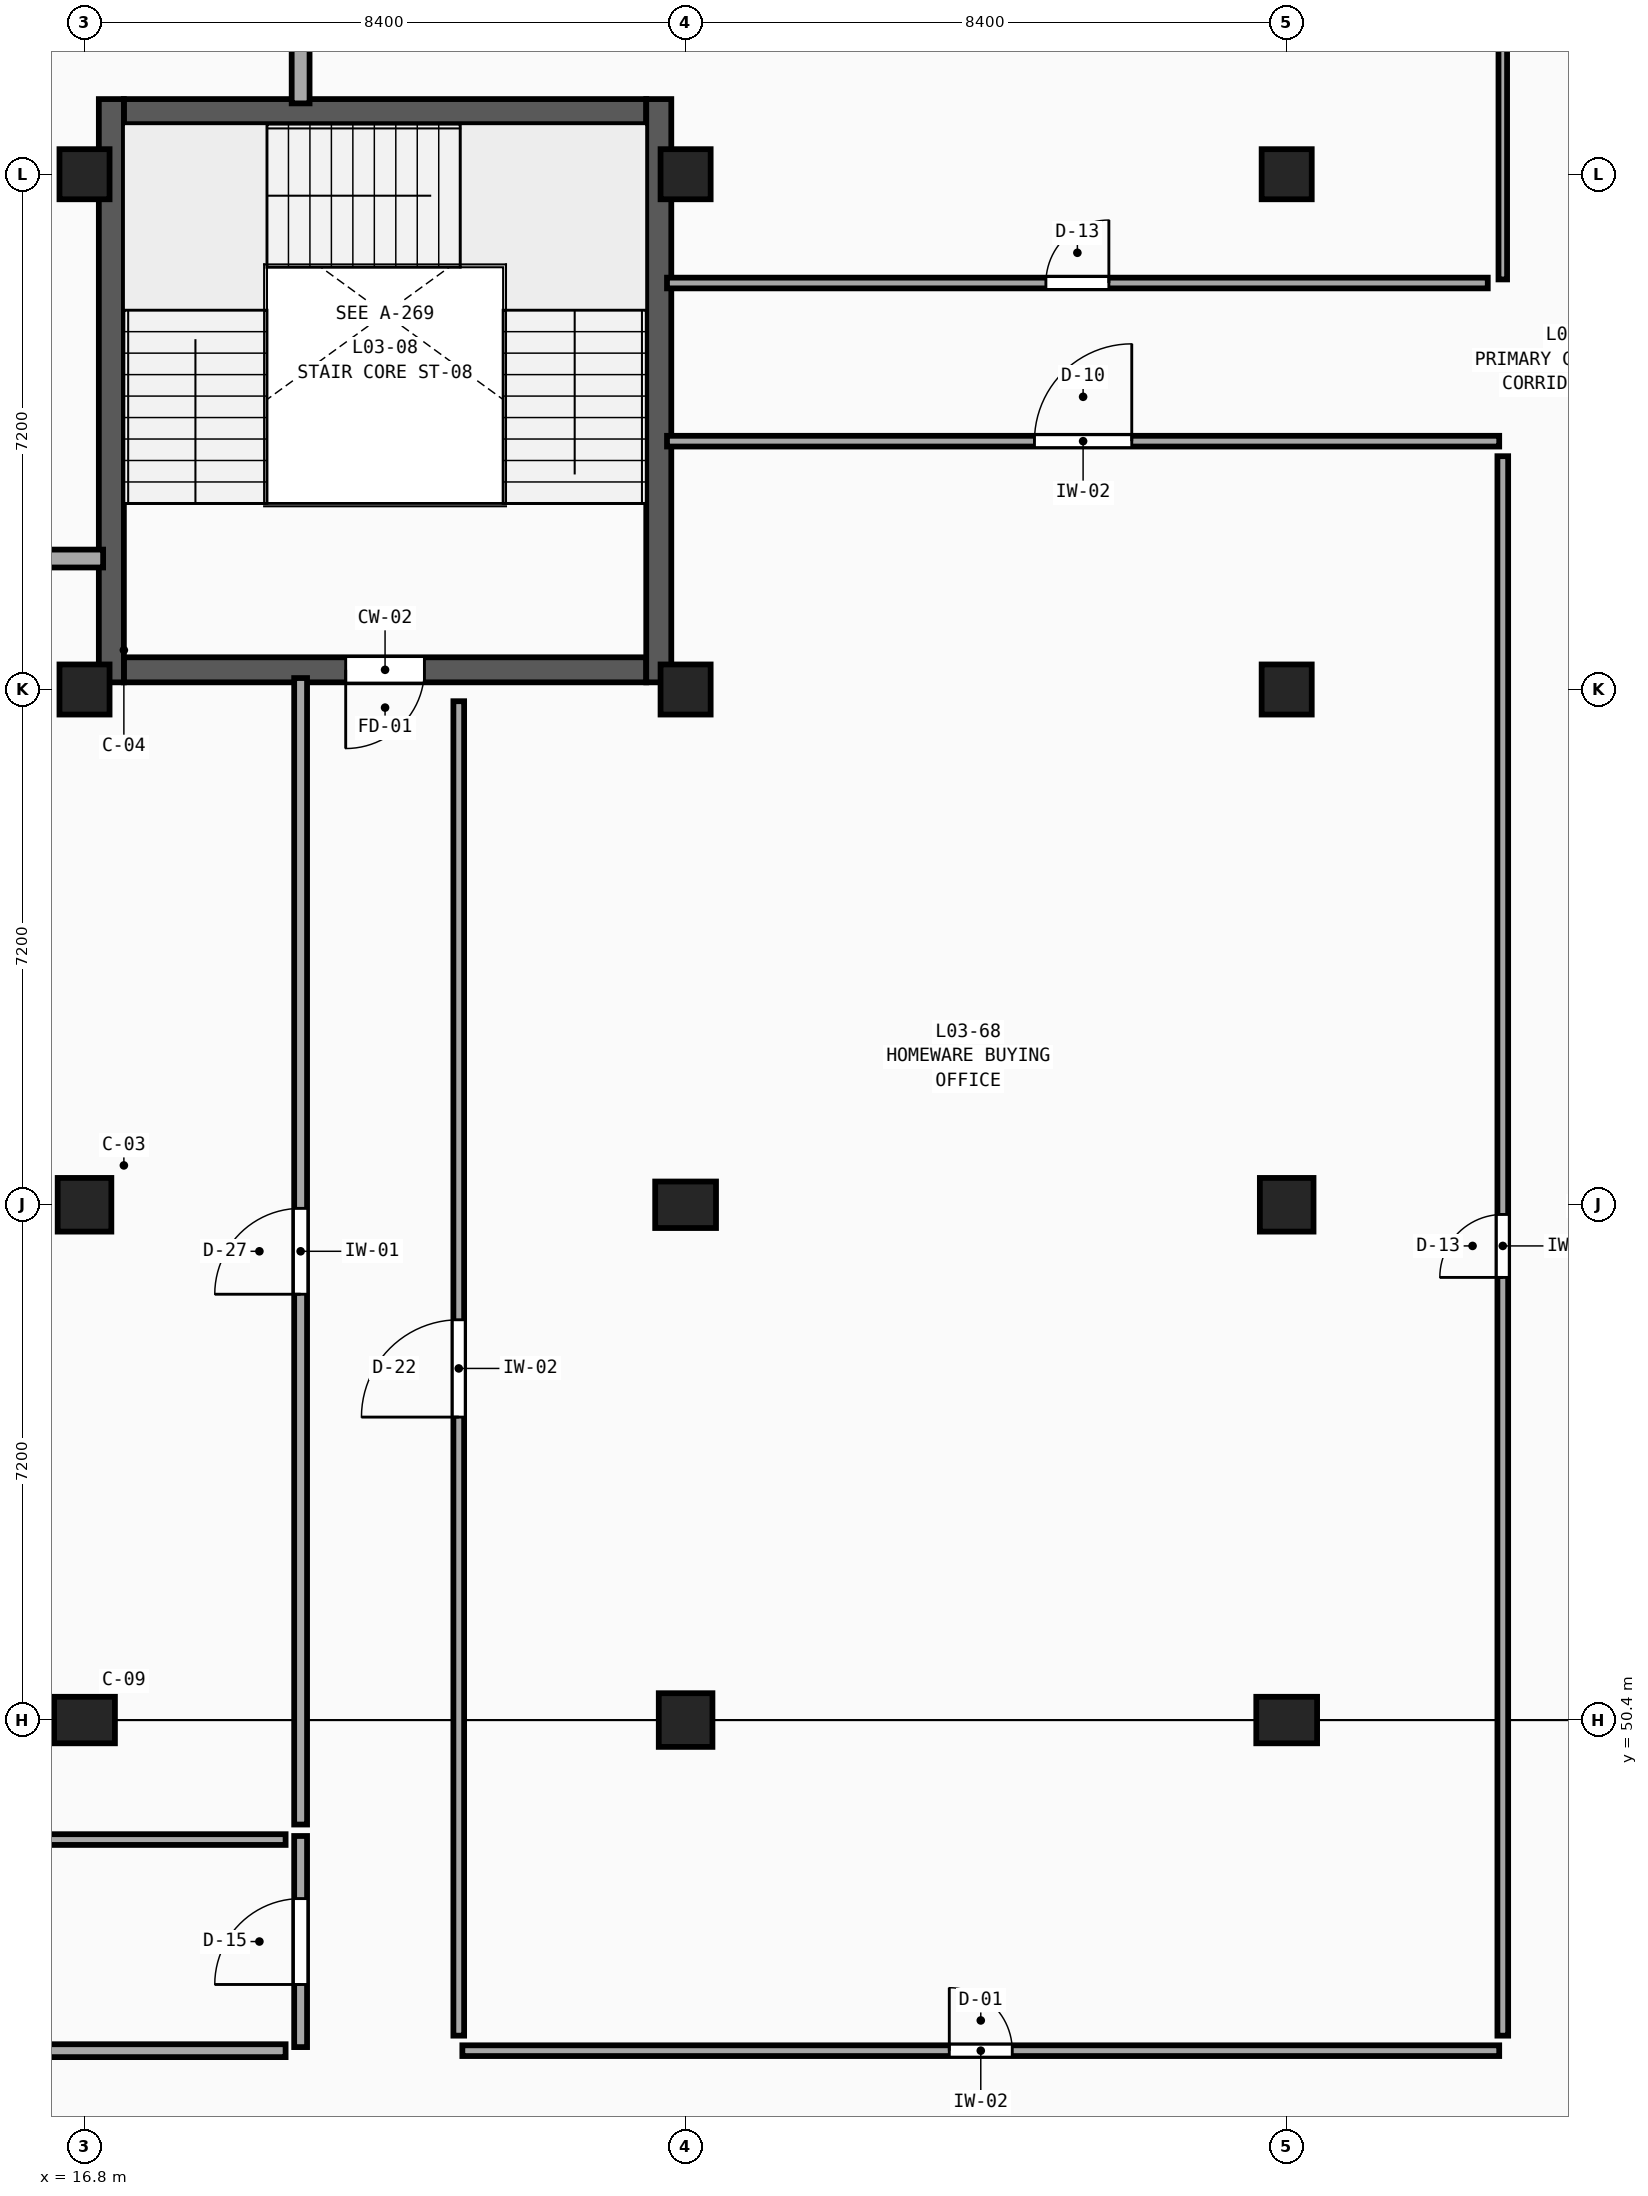
"""IFC4 building model, lengths in metres.
Left out: names, types, materials, properties, quantities, classifications, styles, units other than length and angle.
Written with IfcOpenShell. Run it as: python <this file> out.ifc"""

import sys

from ifc_helpers import new_model, si_unit, direction, frame, frame_2d, origin, origin_2d, place, context, subcontext, project, spatial, rectangle, extrude, element, fill, save


model = new_model("IFC4")
c1 = context("Model", 3, precision=1e-05, world=origin(), true_north=direction((0.0, 1.0)))
c2 = subcontext(c1, "Body", "Model", "MODEL_VIEW")
j1 = project(units=[si_unit("LENGTHUNIT", "METRE"), si_unit("PLANEANGLEUNIT", "RADIAN")], contexts=[c1])
p1 = place(None, origin())
s1 = spatial("IfcSite", under=j1, at=p1, CompositionType="ELEMENT")
p2 = place(p1, origin())
s2 = spatial("IfcBuilding", under=s1, at=p2, CompositionType="ELEMENT")
p3 = place(p2, frame((0.0, 0.0, 14.4)))
s3 = spatial("IfcBuildingStorey", under=s2, at=p3, CompositionType="ELEMENT", Elevation=14.4)
p4 = place(p3, frame((16.8, 50.4, 0.0), z_axis=(0.0, 0.0, 1.0), x_axis=(1.0, 0.0, 0.0)))
e1 = element("IfcColumn", 1, at=p4, inside=s3, PredefinedType="COLUMN", context=c2, shape_type="SweptSolid", body=[
    extrude(rectangle(XDim=0.85, YDim=0.65, at=origin_2d()), origin(), (0.0, 0.0, 1.0), 4.5),
])
p5 = place(p3, frame((16.8, 57.6, 0.0), z_axis=(0.0, 0.0, 1.0), x_axis=(1.0, 0.0, 0.0)))
e2 = element("IfcColumn", 2, at=p5, inside=s3, PredefinedType="COLUMN", context=c2, shape_type="SweptSolid", body=[
    extrude(rectangle(XDim=0.75, YDim=0.75, at=origin_2d()), origin(), (0.0, 0.0, 1.0), 4.5),
])
for number, where, z_axis, x_axis in (
    (3, (16.8, 64.8, 0.0), (0.0, 0.0, 1.0), (1.0, 0.0, 0.0)),
    (4, (16.8, 72.0, 0.0), (0.0, 0.0, 1.0), (1.0, 0.0, 0.0)),
):
    element("IfcColumn", number, at=place(p3, frame(where, z_axis=z_axis, x_axis=x_axis)), inside=s3, PredefinedType="COLUMN", context=c2, shape_type="SweptSolid", body=[
        extrude(rectangle(XDim=0.7, YDim=0.7, at=origin_2d()), origin(), (0.0, 0.0, 1.0), 4.5),
    ])
p6 = place(p3, frame((25.2, 50.4, 0.0), z_axis=(0.0, 0.0, 1.0), x_axis=(1.0, 0.0, 0.0)))
e5 = element("IfcColumn", 5, at=p6, inside=s3, PredefinedType="COLUMN", context=c2, shape_type="SweptSolid", body=[
    extrude(rectangle(XDim=0.75, YDim=0.75, at=origin_2d()), origin(), (0.0, 0.0, 1.0), 4.5),
])
p7 = place(p3, frame((25.2, 57.6, 0.0), z_axis=(0.0, 0.0, 1.0), x_axis=(1.0, 0.0, 0.0)))
e6 = element("IfcColumn", 6, at=p7, inside=s3, PredefinedType="COLUMN", context=c2, shape_type="SweptSolid", body=[
    extrude(rectangle(XDim=0.85, YDim=0.65, at=origin_2d()), origin(), (0.0, 0.0, 1.0), 4.5),
])
for number, where, z_axis, x_axis in (
    (7, (25.2, 64.8, 0.0), (0.0, 0.0, 1.0), (1.0, 0.0, 0.0)),
    (8, (25.2, 72.0, 0.0), (0.0, 0.0, 1.0), (1.0, 0.0, 0.0)),
):
    element("IfcColumn", number, at=place(p3, frame(where, z_axis=z_axis, x_axis=x_axis)), inside=s3, PredefinedType="COLUMN", context=c2, shape_type="SweptSolid", body=[
        extrude(rectangle(XDim=0.7, YDim=0.7, at=origin_2d()), origin(), (0.0, 0.0, 1.0), 4.5),
    ])
p8 = place(p3, frame((33.6, 50.4, 0.0), z_axis=(0.0, 0.0, 1.0), x_axis=(1.0, 0.0, 0.0)))
e9 = element("IfcColumn", 9, at=p8, inside=s3, PredefinedType="COLUMN", context=c2, shape_type="SweptSolid", body=[
    extrude(rectangle(XDim=0.85, YDim=0.65, at=origin_2d()), origin(), (0.0, 0.0, 1.0), 4.5),
])
p9 = place(p3, frame((33.6, 57.6, 0.0), z_axis=(0.0, 0.0, 1.0), x_axis=(1.0, 0.0, 0.0)))
e10 = element("IfcColumn", 10, at=p9, inside=s3, PredefinedType="COLUMN", context=c2, shape_type="SweptSolid", body=[
    extrude(rectangle(XDim=0.75, YDim=0.75, at=origin_2d()), origin(), (0.0, 0.0, 1.0), 4.5),
])
for number, where, z_axis, x_axis in (
    (11, (33.6, 64.8, 0.0), (0.0, 0.0, 1.0), (1.0, 0.0, 0.0)),
    (12, (33.6, 72.0, 0.0), (0.0, 0.0, 1.0), (1.0, 0.0, 0.0)),
):
    element("IfcColumn", number, at=place(p3, frame(where, z_axis=z_axis, x_axis=x_axis)), inside=s3, PredefinedType="COLUMN", context=c2, shape_type="SweptSolid", body=[
        extrude(rectangle(XDim=0.7, YDim=0.7, at=origin_2d()), origin(), (0.0, 0.0, 1.0), 4.5),
    ])
p10 = place(p3, frame((24.65, 65.075, 0.0), z_axis=(0.0, 0.0, 1.0), x_axis=(-1.0, 0.0, 0.0)))
e13 = element("IfcWall", 13, at=p10, inside=s3, PredefinedType="SHEAR", context=c2, shape_type="SweptSolid", body=[
    extrude(rectangle(XDim=7.3, YDim=0.35, at=frame_2d((3.65, 0.0))), origin(), (0.0, 0.0, 1.0), 4.5),
])
p11 = place(p10, frame((3.1, 0.0, 0.0)))
e14 = element("IfcOpeningElement", 14, at=p11, cuts=e13, PredefinedType="OPENING", context=c2, shape_type="SweptSolid", body=[
    extrude(rectangle(XDim=1.1, YDim=2.2, at=frame_2d((0.55, 1.1))), frame((0.0, 0.195, 0.0), z_axis=(0.0, -1.0, 0.0), x_axis=(1.0, 0.0, 0.0)), (0.0, 0.0, 1.0), 0.39),
])
p12 = place(p3, frame((17.35, 72.875, 0.0), z_axis=(0.0, 0.0, 1.0), x_axis=(1.0, 0.0, 0.0)))
e15 = element("IfcWall", 15, at=p12, inside=s3, PredefinedType="SHEAR", context=c2, shape_type="SweptSolid", body=[
    extrude(rectangle(XDim=7.3, YDim=0.35, at=frame_2d((3.65, 0.0))), origin(), (0.0, 0.0, 1.0), 4.5),
])
for number, where, z_axis, x_axis in (
    (16, (17.175, 73.05, 0.0), (0.0, 0.0, 1.0), (0.0, -1.0, 0.0)),
    (17, (24.825, 64.9, 0.0), (0.0, 0.0, 1.0), (0.0, 1.0, 0.0)),
):
    element("IfcWall", number, at=place(p3, frame(where, z_axis=z_axis, x_axis=x_axis)), inside=s3, PredefinedType="SHEAR", context=c2, shape_type="SweptSolid", body=[
        extrude(rectangle(XDim=8.15, YDim=0.35, at=frame_2d((4.075, 0.0))), origin(), (0.0, 0.0, 1.0), 4.5),
    ])
p13 = place(p3, frame((36.62, 45.99, 0.0), z_axis=(0.0, 0.0, 1.0), x_axis=(0.0, 1.0, 0.0)))
e18 = element("IfcWall", 18, at=p13, inside=s3, PredefinedType="PARTITIONING", context=c2, shape_type="SweptSolid", body=[
    extrude(rectangle(XDim=22.07, YDim=0.15, at=frame_2d((11.035, 0.0))), origin(), (0.0, 0.0, 1.0), 4.18),
])
p14 = place(p13, frame((10.595, 0.0, 0.0)))
e19 = element("IfcOpeningElement", 19, at=p14, cuts=e18, PredefinedType="OPENING", context=c2, shape_type="SweptSolid", body=[
    extrude(rectangle(XDim=0.88, YDim=2.21, at=frame_2d((0.44, 1.105))), frame((0.0, 0.095, 0.0), z_axis=(0.0, -1.0, 0.0), x_axis=(1.0, 0.0, 0.0)), (0.0, 0.0, 1.0), 0.19),
])
p15 = place(p3, frame((22.03, 45.99, 0.0), z_axis=(0.0, 0.0, 1.0), x_axis=(0.0, 1.0, 0.0)))
e20 = element("IfcWall", 20, at=p15, inside=s3, PredefinedType="PARTITIONING", context=c2, shape_type="SweptSolid", body=[
    extrude(rectangle(XDim=18.646, YDim=0.15, at=frame_2d((9.323, 0.0))), origin(), (0.0, 0.0, 1.0), 4.18),
])
p16 = place(p15, frame((8.643, 0.0, 0.0)))
e21 = element("IfcOpeningElement", 21, at=p16, cuts=e20, PredefinedType="OPENING", context=c2, shape_type="SweptSolid", body=[
    extrude(rectangle(XDim=1.36, YDim=2.29, at=frame_2d((0.68, 1.145))), frame((0.0, 0.095, 0.0), z_axis=(0.0, -1.0, 0.0), x_axis=(1.0, 0.0, 0.0)), (0.0, 0.0, 1.0), 0.19),
])
p17 = place(p3, frame((0.73, 45.78, 0.0), z_axis=(0.0, 0.0, 1.0), x_axis=(1.0, 0.0, 0.0)))
e22 = element("IfcWall", 22, at=p17, inside=s3, PredefinedType="PARTITIONING", context=c2, shape_type="SweptSolid", body=[
    extrude(rectangle(XDim=18.88, YDim=0.18, at=frame_2d((9.44, 0.0))), origin(), (0.0, 0.0, 1.0), 4.18),
])
p18 = place(p17, frame((8.6, 0.0, 0.0)))
e23 = element("IfcOpeningElement", 23, at=p18, cuts=e22, PredefinedType="OPENING", context=c2, shape_type="SweptSolid", body=[
    extrude(rectangle(XDim=1.68, YDim=2.29, at=frame_2d((0.84, 1.145))), frame((0.0, 0.11, 0.0), z_axis=(0.0, -1.0, 0.0), x_axis=(1.0, 0.0, 0.0)), (0.0, 0.0, 1.0), 0.22),
])
p19 = place(p3, frame((19.82, 48.94, 0.0), z_axis=(0.0, 0.0, 1.0), x_axis=(0.0, 1.0, 0.0)))
e24 = element("IfcWall", 24, at=p19, inside=s3, PredefinedType="PARTITIONING", context=c2, shape_type="SweptSolid", body=[
    extrude(rectangle(XDim=16.02, YDim=0.18, at=frame_2d((8.01, 0.0))), origin(), (0.0, 0.0, 1.0), 4.18),
])
p20 = place(p19, frame((7.41, 0.0, 0.0)))
e25 = element("IfcOpeningElement", 25, at=p20, cuts=e24, PredefinedType="OPENING", context=c2, shape_type="SweptSolid", body=[
    extrude(rectangle(XDim=1.2, YDim=2.37, at=frame_2d((0.6, 1.185))), frame((0.0, 0.11, 0.0), z_axis=(0.0, -1.0, 0.0), x_axis=(1.0, 0.0, 0.0)), (0.0, 0.0, 1.0), 0.22),
])
p21 = place(p3, frame((22.08, 45.78, 0.0), z_axis=(0.0, 0.0, 1.0), x_axis=(1.0, 0.0, 0.0)))
e26 = element("IfcWall", 26, at=p21, inside=s3, PredefinedType="PARTITIONING", context=c2, shape_type="SweptSolid", body=[
    extrude(rectangle(XDim=14.49, YDim=0.15, at=frame_2d((7.245, 0.0))), origin(), (0.0, 0.0, 1.0), 4.18),
])
p22 = place(p21, frame((6.805, 0.0, 0.0)))
e27 = element("IfcOpeningElement", 27, at=p22, cuts=e26, PredefinedType="OPENING", context=c2, shape_type="SweptSolid", body=[
    extrude(rectangle(XDim=0.88, YDim=2.05, at=frame_2d((0.44, 1.025))), frame((0.0, 0.095, 0.0), z_axis=(0.0, -1.0, 0.0), x_axis=(1.0, 0.0, 0.0)), (0.0, 0.0, 1.0), 0.19),
])
p23 = place(p3, frame((36.62, 70.53, 0.0), z_axis=(0.0, 0.0, 1.0), x_axis=(0.0, 1.0, 0.0)))
e28 = element("IfcWall", 28, at=p23, inside=s3, PredefinedType="PARTITIONING", context=c2, shape_type="SweptSolid", body=[
    extrude(rectangle(XDim=13.75, YDim=0.12, at=frame_2d((6.875, 0.0))), origin(), (0.0, 0.0, 1.0), 4.18),
])
p24 = place(p23, frame((6.115, 0.0, 0.0)))
e29 = element("IfcOpeningElement", 29, at=p24, cuts=e28, PredefinedType="OPENING", context=c2, shape_type="SweptSolid", body=[
    extrude(rectangle(XDim=1.52, YDim=2.05, at=frame_2d((0.76, 1.025))), frame((0.0, 0.08, 0.0), z_axis=(0.0, -1.0, 0.0), x_axis=(1.0, 0.0, 0.0)), (0.0, 0.0, 1.0), 0.16),
])
p25 = place(p3, frame((24.94, 68.27, 0.0), z_axis=(0.0, 0.0, 1.0), x_axis=(1.0, 0.0, 0.0)))
e30 = element("IfcWall", 30, at=p25, inside=s3, PredefinedType="PARTITIONING", context=c2, shape_type="SweptSolid", body=[
    extrude(rectangle(XDim=11.63, YDim=0.15, at=frame_2d((5.815, 0.0))), origin(), (0.0, 0.0, 1.0), 4.18),
])
p26 = place(p25, frame((5.135, 0.0, 0.0)))
e31 = element("IfcOpeningElement", 31, at=p26, cuts=e30, PredefinedType="OPENING", context=c2, shape_type="SweptSolid", body=[
    extrude(rectangle(XDim=1.36, YDim=2.13, at=frame_2d((0.68, 1.065))), frame((0.0, 0.095, 0.0), z_axis=(0.0, -1.0, 0.0), x_axis=(1.0, 0.0, 0.0)), (0.0, 0.0, 1.0), 0.19),
])
p27 = place(p3, frame((24.94, 70.48, 0.0), z_axis=(0.0, 0.0, 1.0), x_axis=(1.0, 0.0, 0.0)))
e32 = element("IfcWall", 32, at=p27, inside=s3, PredefinedType="PARTITIONING", context=c2, shape_type="SweptSolid", body=[
    extrude(rectangle(XDim=11.47, YDim=0.15, at=frame_2d((5.735, 0.0))), origin(), (0.0, 0.0, 1.0), 4.18),
])
p28 = place(p27, frame((5.295, 0.0, 0.0)))
e33 = element("IfcOpeningElement", 33, at=p28, cuts=e32, PredefinedType="OPENING", context=c2, shape_type="SweptSolid", body=[
    extrude(rectangle(XDim=0.88, YDim=2.21, at=frame_2d((0.44, 1.105))), frame((0.0, 0.095, 0.0), z_axis=(0.0, -1.0, 0.0), x_axis=(1.0, 0.0, 0.0)), (0.0, 0.0, 1.0), 0.19),
])
p29 = place(p3, frame((19.82, 72.99, 0.0), z_axis=(0.0, 0.0, 1.0), x_axis=(0.0, 1.0, 0.0)))
e34 = element("IfcWall", 34, at=p29, inside=s3, PredefinedType="SOLIDWALL", context=c2, shape_type="SweptSolid", body=[
    extrude(rectangle(XDim=11.29, YDim=0.25, at=frame_2d((5.645, 0.0))), origin(), (0.0, 0.0, 1.0), 4.18),
])
p30 = place(p29, frame((4.745, 0.0, 0.0)))
e35 = element("IfcOpeningElement", 35, at=p30, cuts=e34, PredefinedType="OPENING", context=c2, shape_type="SweptSolid", body=[
    extrude(rectangle(XDim=1.8, YDim=2.3, at=frame_2d((0.9, 1.15))), frame((0.0, 0.145, 0.0), z_axis=(0.0, -1.0, 0.0), x_axis=(1.0, 0.0, 0.0)), (0.0, 0.0, 1.0), 0.29),
])
p31 = place(p3, frame((19.82, 45.83, 0.0), z_axis=(0.0, 0.0, 1.0), x_axis=(0.0, 1.0, 0.0)))
e36 = element("IfcWall", 36, at=p31, inside=s3, PredefinedType="PARTITIONING", context=c2, shape_type="SweptSolid", body=[
    extrude(rectangle(XDim=2.95, YDim=0.18, at=frame_2d((1.475, 0.0))), origin(), (0.0, 0.0, 1.0), 4.18),
])
p32 = place(p31, frame((0.875, 0.0, 0.0)))
e37 = element("IfcOpeningElement", 37, at=p32, cuts=e36, PredefinedType="OPENING", context=c2, shape_type="SweptSolid", body=[
    extrude(rectangle(XDim=1.2, YDim=2.21, at=frame_2d((0.6, 1.105))), frame((0.0, 0.11, 0.0), z_axis=(0.0, -1.0, 0.0), x_axis=(1.0, 0.0, 0.0)), (0.0, 0.0, 1.0), 0.22),
])
p33 = place(p3, frame((0.37, 48.73, 0.0), z_axis=(0.0, 0.0, 1.0), x_axis=(1.0, 0.0, 0.0)))
e38 = element("IfcWall", 38, at=p33, inside=s3, PredefinedType="PARTITIONING", context=c2, shape_type="SweptSolid", body=[
    extrude(rectangle(XDim=19.24, YDim=0.15, at=frame_2d((9.62, 0.0))), origin(), (0.0, 0.0, 1.0), 4.18),
])
p34 = place(p3, frame((8.77, 66.63, 0.0), z_axis=(0.0, 0.0, 1.0), x_axis=(1.0, 0.0, 0.0)))
e39 = element("IfcWall", 39, at=p34, inside=s3, PredefinedType="SOLIDWALL", context=c2, shape_type="SweptSolid", body=[
    extrude(rectangle(XDim=8.29, YDim=0.25, at=frame_2d((4.145, 0.0))), origin(), (0.0, 0.0, 1.0), 4.18),
])
p35 = place(p11, origin())
e40 = element("IfcDoor", 40, at=p35, inside=s3, OperationType="SINGLE_SWING_RIGHT", PredefinedType="DOOR", context=c2, shape_type="SweptSolid", body=[
    extrude(rectangle(XDim=1.1, YDim=2.2, at=frame_2d((0.55, 1.1))), frame((0.0, 0.025, 0.0), z_axis=(0.0, -1.0, 0.0), x_axis=(1.0, 0.0, 0.0)), (0.0, 0.0, 1.0), 0.05),
])
fill(e14, e40)
p36 = place(p14, origin())
e41 = element("IfcDoor", 41, at=p36, inside=s3, OperationType="SINGLE_SWING_LEFT", PredefinedType="DOOR", context=c2, shape_type="SweptSolid", body=[
    extrude(rectangle(XDim=0.88, YDim=2.21, at=frame_2d((0.44, 1.105))), frame((0.0, 0.025, 0.0), z_axis=(0.0, -1.0, 0.0), x_axis=(1.0, 0.0, 0.0)), (0.0, 0.0, 1.0), 0.05),
])
fill(e19, e41)
p37 = place(p16, origin())
e42 = element("IfcDoor", 42, at=p37, inside=s3, OperationType="SINGLE_SWING_LEFT", PredefinedType="DOOR", context=c2, shape_type="SweptSolid", body=[
    extrude(rectangle(XDim=1.36, YDim=2.29, at=frame_2d((0.68, 1.145))), frame((0.0, 0.025, 0.0), z_axis=(0.0, -1.0, 0.0), x_axis=(1.0, 0.0, 0.0)), (0.0, 0.0, 1.0), 0.05),
])
fill(e21, e42)
p38 = place(p20, origin())
e43 = element("IfcDoor", 43, at=p38, inside=s3, OperationType="SINGLE_SWING_LEFT", PredefinedType="DOOR", context=c2, shape_type="SweptSolid", body=[
    extrude(rectangle(XDim=1.2, YDim=2.37, at=frame_2d((0.6, 1.185))), frame((0.0, 0.025, 0.0), z_axis=(0.0, -1.0, 0.0), x_axis=(1.0, 0.0, 0.0)), (0.0, 0.0, 1.0), 0.05),
])
fill(e25, e43)
p39 = place(p22, origin())
e44 = element("IfcDoor", 44, at=p39, inside=s3, OperationType="SINGLE_SWING_LEFT", PredefinedType="DOOR", context=c2, shape_type="SweptSolid", body=[
    extrude(rectangle(XDim=0.88, YDim=2.05, at=frame_2d((0.44, 1.025))), frame((0.0, 0.025, 0.0), z_axis=(0.0, -1.0, 0.0), x_axis=(1.0, 0.0, 0.0)), (0.0, 0.0, 1.0), 0.05),
])
fill(e27, e44)
p40 = place(p26, origin())
e45 = element("IfcDoor", 45, at=p40, inside=s3, OperationType="SINGLE_SWING_RIGHT", PredefinedType="DOOR", context=c2, shape_type="SweptSolid", body=[
    extrude(rectangle(XDim=1.36, YDim=2.13, at=frame_2d((0.68, 1.065))), frame((0.0, 0.025, 0.0), z_axis=(0.0, -1.0, 0.0), x_axis=(1.0, 0.0, 0.0)), (0.0, 0.0, 1.0), 0.05),
])
fill(e31, e45)
p41 = place(p28, origin())
e46 = element("IfcDoor", 46, at=p41, inside=s3, OperationType="SINGLE_SWING_RIGHT", PredefinedType="DOOR", context=c2, shape_type="SweptSolid", body=[
    extrude(rectangle(XDim=0.88, YDim=2.21, at=frame_2d((0.44, 1.105))), frame((0.0, 0.025, 0.0), z_axis=(0.0, -1.0, 0.0), x_axis=(1.0, 0.0, 0.0)), (0.0, 0.0, 1.0), 0.05),
])
fill(e33, e46)
p42 = place(p32, origin())
e47 = element("IfcDoor", 47, at=p42, inside=s3, OperationType="SINGLE_SWING_LEFT", PredefinedType="DOOR", context=c2, shape_type="SweptSolid", body=[
    extrude(rectangle(XDim=1.2, YDim=2.21, at=frame_2d((0.6, 1.105))), frame((0.0, 0.025, 0.0), z_axis=(0.0, -1.0, 0.0), x_axis=(1.0, 0.0, 0.0)), (0.0, 0.0, 1.0), 0.05),
])
fill(e37, e47)
save(model, sys.argv[1])
